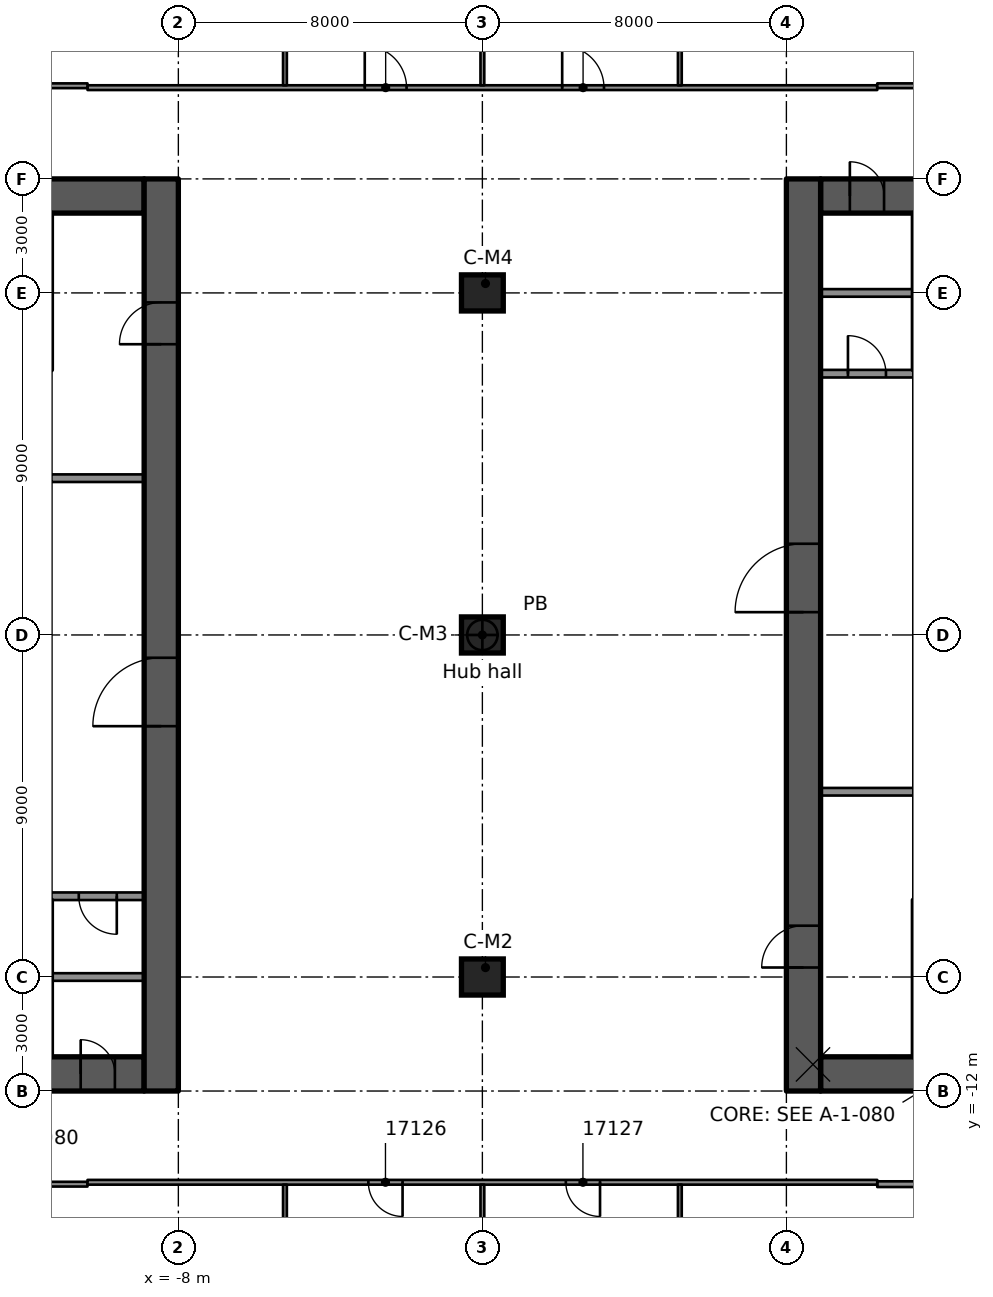
"""IFC4 building model, lengths in metres.
Left out: names, types, materials, properties, quantities, classifications, styles, units other than length and angle.
Written with IfcOpenShell. Run it as: python <this file> out.ifc"""

import sys

from ifc_helpers import new_model, si_unit, direction, frame, frame_2d, origin, origin_2d, place, context, subcontext, project, spatial, rectangle, extrude, element, fill, save


model = new_model("IFC4")
c1 = context("Model", 3, precision=1e-05, world=origin(), true_north=direction((0.0, 1.0)))
c2 = subcontext(c1, "Body", "Model", "MODEL_VIEW")
j1 = project(units=[si_unit("LENGTHUNIT", "METRE"), si_unit("PLANEANGLEUNIT", "RADIAN")], contexts=[c1])
p1 = place(None, origin())
s1 = spatial("IfcSite", under=j1, at=p1, CompositionType="ELEMENT")
p2 = place(p1, origin())
s2 = spatial("IfcBuilding", under=s1, at=p2, CompositionType="ELEMENT")
p3 = place(p2, frame((0.0, 0.0, 84.2)))
s3 = spatial("IfcBuildingStorey", under=s2, at=p3, CompositionType="ELEMENT", Elevation=84.2)
p4 = place(p3, frame((-18.1, 11.55, 0.0), z_axis=(0.0, 0.0, 1.0), x_axis=(1.0, 0.0, 0.0)))
e1 = element("IfcWall", 1, at=p4, inside=s3, PredefinedType="SHEAR", context=c2, shape_type="SweptSolid", body=[
    extrude(rectangle(XDim=9.2, YDim=0.9, at=frame_2d((4.6, 0.0))), origin(), (0.0, 0.0, 1.0), 3.5),
])
p5 = place(p4, frame((5.1, 0.0, 0.0)))
e2 = element("IfcOpeningElement", 2, at=p5, cuts=e1, PredefinedType="OPENING", context=c2, shape_type="SweptSolid", body=[
    extrude(rectangle(XDim=1.1, YDim=2.1, at=frame_2d((0.55, 1.05))), frame((0.0, 0.46, 0.0), z_axis=(0.0, -1.0, 0.0), x_axis=(1.0, 0.0, 0.0)), (0.0, 0.0, 1.0), 0.92),
])
p6 = place(p3, frame((-18.1, -11.55, 0.0), z_axis=(0.0, 0.0, 1.0), x_axis=(1.0, 0.0, 0.0)))
e3 = element("IfcWall", 3, at=p6, inside=s3, PredefinedType="SHEAR", context=c2, shape_type="SweptSolid", body=[
    extrude(rectangle(XDim=9.2, YDim=0.9, at=frame_2d((4.6, 0.0))), origin(), (0.0, 0.0, 1.0), 3.5),
])
p7 = place(p6, frame((5.1, 0.0, 0.0)))
e4 = element("IfcOpeningElement", 4, at=p7, cuts=e3, PredefinedType="OPENING", context=c2, shape_type="SweptSolid", body=[
    extrude(rectangle(XDim=1.1, YDim=2.1, at=frame_2d((0.55, 1.05))), frame((0.0, 0.46, 0.0), z_axis=(0.0, -1.0, 0.0), x_axis=(1.0, 0.0, 0.0)), (0.0, 0.0, 1.0), 0.92),
])
p8 = place(p6, frame((7.53, 0.0, 0.0)))
e5 = element("IfcOpeningElement", 5, at=p8, cuts=e3, PredefinedType="OPENING", context=c2, shape_type="SweptSolid", body=[
    extrude(rectangle(XDim=0.9, YDim=2.1, at=frame_2d((0.45, 1.05))), frame((0.0, 0.46, 0.0), z_axis=(0.0, -1.0, 0.0), x_axis=(1.0, 0.0, 0.0)), (0.0, 0.0, 1.0), 0.92),
])
p9 = place(p3, frame((-8.45, -12.0, 0.0), z_axis=(0.0, 0.0, 1.0), x_axis=(0.0, 1.0, 0.0)))
e6 = element("IfcWall", 6, at=p9, inside=s3, PredefinedType="SHEAR", context=c2, shape_type="SweptSolid", body=[
    extrude(rectangle(XDim=24.0, YDim=0.9, at=frame_2d((12.0, 0.0))), origin(), (0.0, 0.0, 1.0), 3.5),
])
p10 = place(p9, frame((9.6, 0.0, 0.0)))
e7 = element("IfcOpeningElement", 7, at=p10, cuts=e6, PredefinedType="OPENING", context=c2, shape_type="SweptSolid", body=[
    extrude(rectangle(XDim=1.8, YDim=2.1, at=frame_2d((0.9, 1.05))), frame((0.0, 0.46, 0.0), z_axis=(0.0, -1.0, 0.0), x_axis=(1.0, 0.0, 0.0)), (0.0, 0.0, 1.0), 0.92),
])
p11 = place(p9, frame((19.65, 0.0, 0.0)))
e8 = element("IfcOpeningElement", 8, at=p11, cuts=e6, PredefinedType="OPENING", context=c2, shape_type="SweptSolid", body=[
    extrude(rectangle(XDim=1.1, YDim=2.1, at=frame_2d((0.55, 1.05))), frame((0.0, 0.46, 0.0), z_axis=(0.0, -1.0, 0.0), x_axis=(1.0, 0.0, 0.0)), (0.0, 0.0, 1.0), 0.92),
])
p12 = place(p3, frame((8.9, 11.55, 0.0), z_axis=(0.0, 0.0, 1.0), x_axis=(1.0, 0.0, 0.0)))
e9 = element("IfcWall", 9, at=p12, inside=s3, PredefinedType="SHEAR", context=c2, shape_type="SweptSolid", body=[
    extrude(rectangle(XDim=9.2, YDim=0.9, at=frame_2d((4.6, 0.0))), origin(), (0.0, 0.0, 1.0), 3.5),
])
p13 = place(p12, frame((3.0, 0.0, 0.0)))
e10 = element("IfcOpeningElement", 10, at=p13, cuts=e9, PredefinedType="OPENING", context=c2, shape_type="SweptSolid", body=[
    extrude(rectangle(XDim=1.1, YDim=2.1, at=frame_2d((0.55, 1.05))), frame((0.0, 0.46, 0.0), z_axis=(0.0, -1.0, 0.0), x_axis=(1.0, 0.0, 0.0)), (0.0, 0.0, 1.0), 0.92),
])
p14 = place(p12, frame((0.77, 0.0, 0.0)))
e11 = element("IfcOpeningElement", 11, at=p14, cuts=e9, PredefinedType="OPENING", context=c2, shape_type="SweptSolid", body=[
    extrude(rectangle(XDim=0.9, YDim=2.1, at=frame_2d((0.45, 1.05))), frame((0.0, 0.46, 0.0), z_axis=(0.0, -1.0, 0.0), x_axis=(1.0, 0.0, 0.0)), (0.0, 0.0, 1.0), 0.92),
])
p15 = place(p3, frame((8.9, -11.55, 0.0), z_axis=(0.0, 0.0, 1.0), x_axis=(1.0, 0.0, 0.0)))
e12 = element("IfcWall", 12, at=p15, inside=s3, PredefinedType="SHEAR", context=c2, shape_type="SweptSolid", body=[
    extrude(rectangle(XDim=9.2, YDim=0.9, at=frame_2d((4.6, 0.0))), origin(), (0.0, 0.0, 1.0), 3.5),
])
p16 = place(p15, frame((3.0, 0.0, 0.0)))
e13 = element("IfcOpeningElement", 13, at=p16, cuts=e12, PredefinedType="OPENING", context=c2, shape_type="SweptSolid", body=[
    extrude(rectangle(XDim=1.1, YDim=2.1, at=frame_2d((0.55, 1.05))), frame((0.0, 0.46, 0.0), z_axis=(0.0, -1.0, 0.0), x_axis=(1.0, 0.0, 0.0)), (0.0, 0.0, 1.0), 0.92),
])
p17 = place(p3, frame((8.45, -12.0, 0.0), z_axis=(0.0, 0.0, 1.0), x_axis=(0.0, 1.0, 0.0)))
e14 = element("IfcWall", 14, at=p17, inside=s3, PredefinedType="SHEAR", context=c2, shape_type="SweptSolid", body=[
    extrude(rectangle(XDim=24.0, YDim=0.9, at=frame_2d((12.0, 0.0))), origin(), (0.0, 0.0, 1.0), 3.5),
])
p18 = place(p17, frame((12.6, 0.0, 0.0)))
e15 = element("IfcOpeningElement", 15, at=p18, cuts=e14, PredefinedType="OPENING", context=c2, shape_type="SweptSolid", body=[
    extrude(rectangle(XDim=1.8, YDim=2.1, at=frame_2d((0.9, 1.05))), frame((0.0, 0.46, 0.0), z_axis=(0.0, -1.0, 0.0), x_axis=(1.0, 0.0, 0.0)), (0.0, 0.0, 1.0), 0.92),
])
p19 = place(p17, frame((3.25, 0.0, 0.0)))
e16 = element("IfcOpeningElement", 16, at=p19, cuts=e14, PredefinedType="OPENING", context=c2, shape_type="SweptSolid", body=[
    extrude(rectangle(XDim=1.1, YDim=2.1, at=frame_2d((0.55, 1.05))), frame((0.0, 0.46, 0.0), z_axis=(0.0, -1.0, 0.0), x_axis=(1.0, 0.0, 0.0)), (0.0, 0.0, 1.0), 0.92),
])
for number, where, z_axis, x_axis in (
    (17, (0.0, -9.0, 0.0), (0.0, 0.0, 1.0), (1.0, 0.0, 0.0)),
    (18, (0.0, 0.0, 0.0), (0.0, 0.0, 1.0), (1.0, 0.0, 0.0)),
    (19, (0.0, 9.0, 0.0), (0.0, 0.0, 1.0), (1.0, 0.0, 0.0)),
):
    element("IfcColumn", number, at=place(p3, frame(where, z_axis=z_axis, x_axis=x_axis)), inside=s3, PredefinedType="COLUMN", context=c2, shape_type="SweptSolid", body=[
        extrude(rectangle(XDim=1.1, YDim=0.95, at=origin_2d()), origin(), (0.0, 0.0, 1.0), 3.5),
    ])
p20 = place(p3, frame((-8.9, 4.125, 0.0), z_axis=(0.0, 0.0, 1.0), x_axis=(-1.0, 0.0, 0.0)))
e20 = element("IfcWall", 20, at=p20, inside=s3, PredefinedType="PARTITIONING", context=c2, shape_type="SweptSolid", body=[
    extrude(rectangle(XDim=2.44, YDim=0.2, at=frame_2d((1.22, 0.0))), origin(), (0.0, 0.0, 1.0), 3.09),
])
p21 = place(p3, frame((-8.9, -6.875, 0.0), z_axis=(0.0, 0.0, 1.0), x_axis=(-1.0, 0.0, 0.0)))
e21 = element("IfcWall", 21, at=p21, inside=s3, PredefinedType="PARTITIONING", context=c2, shape_type="SweptSolid", body=[
    extrude(rectangle(XDim=2.44, YDim=0.2, at=frame_2d((1.22, 0.0))), origin(), (0.0, 0.0, 1.0), 3.09),
])
p22 = place(p21, frame((0.72, 0.0, 0.0)))
e22 = element("IfcOpeningElement", 22, at=p22, cuts=e21, PredefinedType="OPENING", context=c2, shape_type="SweptSolid", body=[
    extrude(rectangle(XDim=1.0, YDim=2.1, at=frame_2d((0.5, 1.05))), frame((0.0, 0.11, 0.0), z_axis=(0.0, -1.0, 0.0), x_axis=(1.0, 0.0, 0.0)), (0.0, 0.0, 1.0), 0.22),
])
for number, where, z_axis, x_axis in (
    (23, (-8.9, -9.0, 0.0), (0.0, 0.0, 1.0), (-1.0, 0.0, 0.0)),
    (24, (8.9, -4.125, 0.0), (0.0, 0.0, 1.0), (1.0, 0.0, 0.0)),
):
    element("IfcWall", number, at=place(p3, frame(where, z_axis=z_axis, x_axis=x_axis)), inside=s3, PredefinedType="PARTITIONING", context=c2, shape_type="SweptSolid", body=[
        extrude(rectangle(XDim=2.44, YDim=0.2, at=frame_2d((1.22, 0.0))), origin(), (0.0, 0.0, 1.0), 3.09),
    ])
p23 = place(p3, frame((8.9, 6.875, 0.0), z_axis=(0.0, 0.0, 1.0), x_axis=(1.0, 0.0, 0.0)))
e25 = element("IfcWall", 25, at=p23, inside=s3, PredefinedType="PARTITIONING", context=c2, shape_type="SweptSolid", body=[
    extrude(rectangle(XDim=2.44, YDim=0.2, at=frame_2d((1.22, 0.0))), origin(), (0.0, 0.0, 1.0), 3.09),
])
p24 = place(p23, frame((0.72, 0.0, 0.0)))
e26 = element("IfcOpeningElement", 26, at=p24, cuts=e25, PredefinedType="OPENING", context=c2, shape_type="SweptSolid", body=[
    extrude(rectangle(XDim=1.0, YDim=2.1, at=frame_2d((0.5, 1.05))), frame((0.0, 0.11, 0.0), z_axis=(0.0, -1.0, 0.0), x_axis=(1.0, 0.0, 0.0)), (0.0, 0.0, 1.0), 0.22),
])
p25 = place(p3, frame((8.9, 9.0, 0.0), z_axis=(0.0, 0.0, 1.0), x_axis=(1.0, 0.0, 0.0)))
e27 = element("IfcWall", 27, at=p25, inside=s3, PredefinedType="PARTITIONING", context=c2, shape_type="SweptSolid", body=[
    extrude(rectangle(XDim=2.44, YDim=0.2, at=frame_2d((1.22, 0.0))), origin(), (0.0, 0.0, 1.0), 3.09),
])
p26 = place(p3, frame((-12.147, -14.451, 0.0), z_axis=(0.0, 0.0, 1.0), x_axis=(1.0, 0.0, 0.0)))
e28 = element("IfcWall", 28, at=p26, inside=s3, PredefinedType="PARTITIONING", context=c2, shape_type="SweptSolid", body=[
    extrude(rectangle(XDim=1.756, YDim=0.125, at=frame_2d((0.878, 0.0))), origin(), (0.0, 0.0, 1.0), 3.08),
])
p27 = place(p3, frame((21.375, -14.451, 0.0), z_axis=(0.0, 0.0, 1.0), x_axis=(-1.0, 0.0, 0.0)))
e29 = element("IfcWall", 29, at=p27, inside=s3, PredefinedType="PARTITIONING", context=c2, shape_type="SweptSolid", body=[
    extrude(rectangle(XDim=10.984, YDim=0.15, at=frame_2d((5.492, 0.0))), origin(), (0.0, 0.0, 1.0), 3.08),
])
p28 = place(p27, frame((7.804, 0.0, 0.0)))
e30 = element("IfcOpeningElement", 30, at=p28, cuts=e29, PredefinedType="OPENING", context=c2, shape_type="SweptSolid", body=[
    extrude(rectangle(XDim=0.9, YDim=2.1, at=frame_2d((0.45, 1.05))), frame((0.0, 0.085, 0.0), z_axis=(0.0, -1.0, 0.0), x_axis=(1.0, 0.0, 0.0)), (0.0, 0.0, 1.0), 0.17),
])
p29 = place(p27, frame((2.275, 0.0, 0.0)))
e31 = element("IfcOpeningElement", 31, at=p29, cuts=e29, PredefinedType="OPENING", context=c2, shape_type="SweptSolid", body=[
    extrude(rectangle(XDim=0.9, YDim=2.1, at=frame_2d((0.45, 1.05))), frame((0.0, 0.085, 0.0), z_axis=(0.0, -1.0, 0.0), x_axis=(1.0, 0.0, 0.0)), (0.0, 0.0, 1.0), 0.17),
])
p30 = place(p3, frame((10.391, -14.401, 0.0), z_axis=(0.0, 0.0, 1.0), x_axis=(-1.0, 0.0, 0.0)))
e32 = element("IfcWall", 32, at=p30, inside=s3, PredefinedType="PARTITIONING", context=c2, shape_type="SweptSolid", body=[
    extrude(rectangle(XDim=20.781, YDim=0.125, at=frame_2d((10.391, 0.0))), origin(), (0.0, 0.0, 1.0), 3.08),
])
p31 = place(p30, frame((12.491, 0.0, 0.0)))
e33 = element("IfcOpeningElement", 33, at=p31, cuts=e32, PredefinedType="OPENING", context=c2, shape_type="SweptSolid", body=[
    extrude(rectangle(XDim=0.9, YDim=2.1, at=frame_2d((0.45, 1.05))), frame((0.0, 0.073, 0.0), z_axis=(0.0, -1.0, 0.0), x_axis=(1.0, 0.0, 0.0)), (0.0, 0.0, 1.0), 0.145),
])
p32 = place(p30, frame((7.295, 0.0, 0.0)))
e34 = element("IfcOpeningElement", 34, at=p32, cuts=e32, PredefinedType="OPENING", context=c2, shape_type="SweptSolid", body=[
    extrude(rectangle(XDim=0.9, YDim=2.1, at=frame_2d((0.45, 1.05))), frame((0.0, 0.073, 0.0), z_axis=(0.0, -1.0, 0.0), x_axis=(1.0, 0.0, 0.0)), (0.0, 0.0, 1.0), 0.145),
])
p33 = place(p3, frame((-10.39, 14.401, 0.0), z_axis=(0.0, 0.0, 1.0), x_axis=(1.0, 0.0, 0.0)))
e35 = element("IfcWall", 35, at=p33, inside=s3, PredefinedType="PARTITIONING", context=c2, shape_type="SweptSolid", body=[
    extrude(rectangle(XDim=20.781, YDim=0.125, at=frame_2d((10.391, 0.0))), origin(), (0.0, 0.0, 1.0), 3.08),
])
p34 = place(p33, frame((12.49, 0.0, 0.0)))
e36 = element("IfcOpeningElement", 36, at=p34, cuts=e35, PredefinedType="OPENING", context=c2, shape_type="SweptSolid", body=[
    extrude(rectangle(XDim=1.1, YDim=2.1, at=frame_2d((0.55, 1.05))), frame((0.0, 0.073, 0.0), z_axis=(0.0, -1.0, 0.0), x_axis=(1.0, 0.0, 0.0)), (0.0, 0.0, 1.0), 0.145),
])
p35 = place(p33, frame((7.295, 0.0, 0.0)))
e37 = element("IfcOpeningElement", 37, at=p35, cuts=e35, PredefinedType="OPENING", context=c2, shape_type="SweptSolid", body=[
    extrude(rectangle(XDim=1.1, YDim=2.1, at=frame_2d((0.55, 1.05))), frame((0.0, 0.073, 0.0), z_axis=(0.0, -1.0, 0.0), x_axis=(1.0, 0.0, 0.0)), (0.0, 0.0, 1.0), 0.145),
])
p36 = place(p3, frame((-21.387, 14.451, 0.0), z_axis=(0.0, 0.0, 1.0), x_axis=(1.0, 0.0, 0.0)))
e38 = element("IfcWall", 38, at=p36, inside=s3, PredefinedType="PARTITIONING", context=c2, shape_type="SweptSolid", body=[
    extrude(rectangle(XDim=10.996, YDim=0.125, at=frame_2d((5.498, 0.0))), origin(), (0.0, 0.0, 1.0), 3.08),
])
p37 = place(p36, frame((7.317, 0.0, 0.0)))
e39 = element("IfcOpeningElement", 39, at=p37, cuts=e38, PredefinedType="OPENING", context=c2, shape_type="SweptSolid", body=[
    extrude(rectangle(XDim=1.8, YDim=2.1, at=frame_2d((0.9, 1.05))), frame((0.0, 0.073, 0.0), z_axis=(0.0, -1.0, 0.0), x_axis=(1.0, 0.0, 0.0)), (0.0, 0.0, 1.0), 0.145),
])
p38 = place(p3, frame((10.391, 14.451, 0.0), z_axis=(0.0, 0.0, 1.0), x_axis=(1.0, 0.0, 0.0)))
e40 = element("IfcWall", 40, at=p38, inside=s3, PredefinedType="PARTITIONING", context=c2, shape_type="SweptSolid", body=[
    extrude(rectangle(XDim=10.996, YDim=0.125, at=frame_2d((5.498, 0.0))), origin(), (0.0, 0.0, 1.0), 3.08),
])
p39 = place(p38, frame((1.85, 0.0, 0.0)))
e41 = element("IfcOpeningElement", 41, at=p39, cuts=e40, PredefinedType="OPENING", context=c2, shape_type="SweptSolid", body=[
    extrude(rectangle(XDim=1.8, YDim=2.1, at=frame_2d((0.9, 1.05))), frame((0.0, 0.073, 0.0), z_axis=(0.0, -1.0, 0.0), x_axis=(1.0, 0.0, 0.0)), (0.0, 0.0, 1.0), 0.145),
])
p40 = place(p3, frame((5.196, -30.043, 0.0), z_axis=(0.0, 0.0, 1.0), x_axis=(0.0, 1.0, 0.0)))
e42 = element("IfcWall", 42, at=p40, inside=s3, PredefinedType="PARTITIONING", context=c2, shape_type="SweptSolid", body=[
    extrude(rectangle(XDim=15.58, YDim=0.1, at=frame_2d((7.79, 0.0))), origin(), (0.0, 0.0, 1.0), 3.08),
])
p41 = place(p3, frame((5.196, 14.463, 0.0), z_axis=(0.0, 0.0, 1.0), x_axis=(0.0, 1.0, 0.0)))
e43 = element("IfcWall", 43, at=p41, inside=s3, PredefinedType="PARTITIONING", context=c2, shape_type="SweptSolid", body=[
    extrude(rectangle(XDim=17.034, YDim=0.1, at=frame_2d((8.517, 0.0))), origin(), (0.0, 0.0, 1.0), 3.08),
])
p42 = place(p3, frame((0.0, -34.871, 0.0), z_axis=(0.0, 0.0, 1.0), x_axis=(0.0, 1.0, 0.0)))
e44 = element("IfcWall", 44, at=p42, inside=s3, PredefinedType="PARTITIONING", context=c2, shape_type="SweptSolid", body=[
    extrude(rectangle(XDim=20.408, YDim=0.1, at=frame_2d((10.204, 0.0))), origin(), (0.0, 0.0, 1.0), 3.08),
])
p43 = place(p3, frame((0.0, 14.463, 0.0), z_axis=(0.0, 0.0, 1.0), x_axis=(0.0, 1.0, 0.0)))
e45 = element("IfcWall", 45, at=p43, inside=s3, PredefinedType="PARTITIONING", context=c2, shape_type="SweptSolid", body=[
    extrude(rectangle(XDim=17.169, YDim=0.1, at=frame_2d((8.584, 0.0))), origin(), (0.0, 0.0, 1.0), 3.08),
])
p44 = place(p3, frame((-5.195, -35.127, 0.0), z_axis=(0.0, 0.0, 1.0), x_axis=(0.0, 1.0, 0.0)))
e46 = element("IfcWall", 46, at=p44, inside=s3, PredefinedType="PARTITIONING", context=c2, shape_type="SweptSolid", body=[
    extrude(rectangle(XDim=20.664, YDim=0.1, at=frame_2d((10.332, 0.0))), origin(), (0.0, 0.0, 1.0), 3.08),
])
p45 = place(p3, frame((-5.195, 14.463, 0.0), z_axis=(0.0, 0.0, 1.0), x_axis=(0.0, 1.0, 0.0)))
e47 = element("IfcWall", 47, at=p45, inside=s3, PredefinedType="PARTITIONING", context=c2, shape_type="SweptSolid", body=[
    extrude(rectangle(XDim=15.581, YDim=0.1, at=frame_2d((7.791, 0.0))), origin(), (0.0, 0.0, 1.0), 3.08),
])
p46 = place(p10, origin())
e48 = element("IfcDoor", 48, at=p46, inside=s3, OperationType="SINGLE_SWING_LEFT", PredefinedType="DOOR", context=c2, shape_type="SweptSolid", body=[
    extrude(rectangle(XDim=1.8, YDim=2.1, at=frame_2d((0.9, 1.05))), frame((0.0, 0.025, 0.0), z_axis=(0.0, -1.0, 0.0), x_axis=(1.0, 0.0, 0.0)), (0.0, 0.0, 1.0), 0.05),
])
fill(e7, e48)
p47 = place(p11, origin())
e49 = element("IfcDoor", 49, at=p47, inside=s3, OperationType="SINGLE_SWING_RIGHT", PredefinedType="DOOR", context=c2, shape_type="SweptSolid", body=[
    extrude(rectangle(XDim=1.1, YDim=2.1, at=frame_2d((0.55, 1.05))), frame((0.0, 0.025, 0.0), z_axis=(0.0, -1.0, 0.0), x_axis=(1.0, 0.0, 0.0)), (0.0, 0.0, 1.0), 0.05),
])
fill(e8, e49)
p48 = place(p8, origin())
e50 = element("IfcDoor", 50, at=p48, inside=s3, OperationType="SINGLE_SWING_RIGHT", PredefinedType="DOOR", context=c2, shape_type="SweptSolid", body=[
    extrude(rectangle(XDim=0.9, YDim=2.1, at=frame_2d((0.45, 1.05))), frame((0.0, 0.025, 0.0), z_axis=(0.0, -1.0, 0.0), x_axis=(1.0, 0.0, 0.0)), (0.0, 0.0, 1.0), 0.05),
])
fill(e5, e50)
p49 = place(p22, origin())
e51 = element("IfcDoor", 51, at=p49, inside=s3, OperationType="SINGLE_SWING_RIGHT", PredefinedType="DOOR", context=c2, shape_type="SweptSolid", body=[
    extrude(rectangle(XDim=1.0, YDim=2.1, at=frame_2d((0.5, 1.05))), frame((0.0, 0.025, 0.0), z_axis=(0.0, -1.0, 0.0), x_axis=(1.0, 0.0, 0.0)), (0.0, 0.0, 1.0), 0.05),
])
fill(e22, e51)
p50 = place(p18, origin())
e52 = element("IfcDoor", 52, at=p50, inside=s3, OperationType="SINGLE_SWING_RIGHT", PredefinedType="DOOR", context=c2, shape_type="SweptSolid", body=[
    extrude(rectangle(XDim=1.8, YDim=2.1, at=frame_2d((0.9, 1.05))), frame((0.0, 0.025, 0.0), z_axis=(0.0, -1.0, 0.0), x_axis=(1.0, 0.0, 0.0)), (0.0, 0.0, 1.0), 0.05),
])
fill(e15, e52)
p51 = place(p19, origin())
e53 = element("IfcDoor", 53, at=p51, inside=s3, OperationType="SINGLE_SWING_LEFT", PredefinedType="DOOR", context=c2, shape_type="SweptSolid", body=[
    extrude(rectangle(XDim=1.1, YDim=2.1, at=frame_2d((0.55, 1.05))), frame((0.0, 0.025, 0.0), z_axis=(0.0, -1.0, 0.0), x_axis=(1.0, 0.0, 0.0)), (0.0, 0.0, 1.0), 0.05),
])
fill(e16, e53)
p52 = place(p14, origin())
e54 = element("IfcDoor", 54, at=p52, inside=s3, OperationType="SINGLE_SWING_LEFT", PredefinedType="DOOR", context=c2, shape_type="SweptSolid", body=[
    extrude(rectangle(XDim=0.9, YDim=2.1, at=frame_2d((0.45, 1.05))), frame((0.0, 0.025, 0.0), z_axis=(0.0, -1.0, 0.0), x_axis=(1.0, 0.0, 0.0)), (0.0, 0.0, 1.0), 0.05),
])
fill(e11, e54)
p53 = place(p24, origin())
e55 = element("IfcDoor", 55, at=p53, inside=s3, OperationType="SINGLE_SWING_RIGHT", PredefinedType="DOOR", context=c2, shape_type="SweptSolid", body=[
    extrude(rectangle(XDim=1.0, YDim=2.1, at=frame_2d((0.5, 1.05))), frame((0.0, 0.025, 0.0), z_axis=(0.0, -1.0, 0.0), x_axis=(1.0, 0.0, 0.0)), (0.0, 0.0, 1.0), 0.05),
])
fill(e26, e55)
p54 = place(p31, origin())
e56 = element("IfcDoor", 56, at=p54, inside=s3, OperationType="SINGLE_SWING_RIGHT", PredefinedType="DOOR", context=c2, shape_type="SweptSolid", body=[
    extrude(rectangle(XDim=0.9, YDim=2.1, at=frame_2d((0.45, 1.05))), frame((0.0, 0.025, 0.0), z_axis=(0.0, -1.0, 0.0), x_axis=(1.0, 0.0, 0.0)), (0.0, 0.0, 1.0), 0.05),
])
fill(e33, e56)
p55 = place(p32, origin())
e57 = element("IfcDoor", 57, at=p55, inside=s3, OperationType="SINGLE_SWING_LEFT", PredefinedType="DOOR", context=c2, shape_type="SweptSolid", body=[
    extrude(rectangle(XDim=0.9, YDim=2.1, at=frame_2d((0.45, 1.05))), frame((0.0, 0.025, 0.0), z_axis=(0.0, -1.0, 0.0), x_axis=(1.0, 0.0, 0.0)), (0.0, 0.0, 1.0), 0.05),
])
fill(e34, e57)
p56 = place(p34, origin())
e58 = element("IfcDoor", 58, at=p56, inside=s3, OperationType="SINGLE_SWING_RIGHT", PredefinedType="DOOR", context=c2, shape_type="SweptSolid", body=[
    extrude(rectangle(XDim=1.1, YDim=2.1, at=frame_2d((0.55, 1.05))), frame((0.0, 0.025, 0.0), z_axis=(0.0, -1.0, 0.0), x_axis=(1.0, 0.0, 0.0)), (0.0, 0.0, 1.0), 0.05),
])
fill(e36, e58)
p57 = place(p35, origin())
e59 = element("IfcDoor", 59, at=p57, inside=s3, OperationType="SINGLE_SWING_LEFT", PredefinedType="DOOR", context=c2, shape_type="SweptSolid", body=[
    extrude(rectangle(XDim=1.1, YDim=2.1, at=frame_2d((0.55, 1.05))), frame((0.0, 0.025, 0.0), z_axis=(0.0, -1.0, 0.0), x_axis=(1.0, 0.0, 0.0)), (0.0, 0.0, 1.0), 0.05),
])
fill(e37, e59)
save(model, sys.argv[1])
